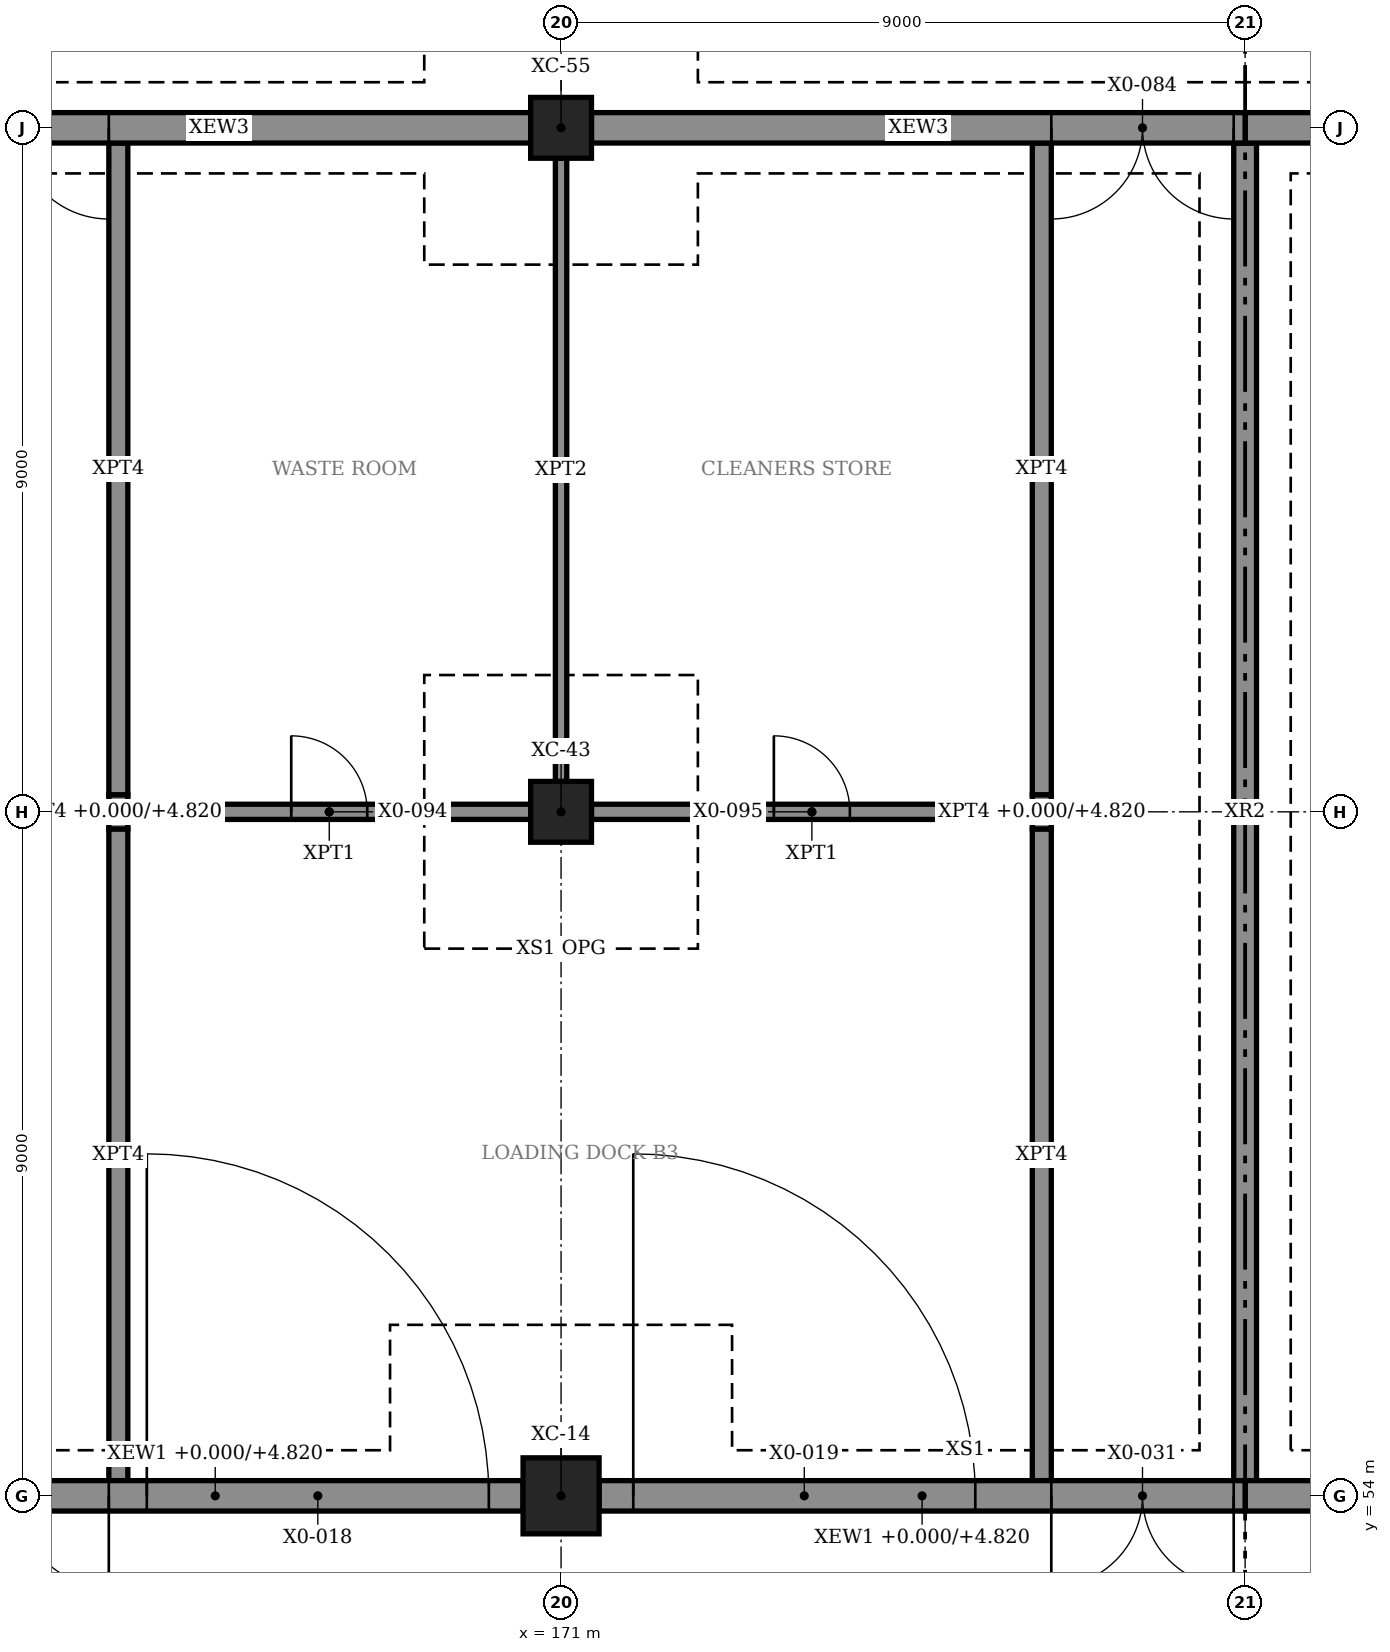
"""IFC4 building model, lengths in metres.
Left out: names, types, materials, properties, quantities, classifications, styles, units other than length and angle.
Written with IfcOpenShell. Run it as: python <this file> out.ifc"""

import sys

from ifc_helpers import new_model, si_unit, direction, frame, frame_2d, origin, origin_2d, place, context, subcontext, project, spatial, rectangle, hollow_rectangle, extrude, element, fill, save


model = new_model("IFC4")
c1 = context("Model", 3, precision=1e-05, world=origin(), true_north=direction((0.0, 1.0)))
c2 = subcontext(c1, "Body", "Model", "MODEL_VIEW")
j1 = project(units=[si_unit("LENGTHUNIT", "METRE"), si_unit("PLANEANGLEUNIT", "RADIAN")], contexts=[c1])
p1 = place(None, origin())
s1 = spatial("IfcSite", under=j1, at=p1, CompositionType="ELEMENT")
p2 = place(p1, origin())
s2 = spatial("IfcBuilding", under=s1, at=p2, CompositionType="ELEMENT")
p3 = place(p2, origin())
s3 = spatial("IfcBuildingStorey", under=s2, at=p3, CompositionType="ELEMENT", Elevation=0.0)
p4 = place(p3, frame((171.0, 54.0, 0.0), z_axis=(0.0, 0.0, 1.0), x_axis=(1.0, 0.0, 0.0)))
e1 = element("IfcColumn", 1, at=p4, inside=s3, PredefinedType="COLUMN", context=c2, shape_type="SweptSolid", body=[
    extrude(hollow_rectangle(XDim=1.0, YDim=1.0, WallThickness=0.032, at=origin_2d()), origin(), (0.0, 0.0, 1.0), 6.0),
])
for number, where, z_axis, x_axis in (
    (2, (171.0, 63.0, 0.0), (0.0, 0.0, 1.0), (1.0, 0.0, 0.0)),
    (3, (171.0, 72.0, 0.0), (0.0, 0.0, 1.0), (1.0, 0.0, 0.0)),
):
    element("IfcColumn", number, at=place(p3, frame(where, z_axis=z_axis, x_axis=x_axis)), inside=s3, PredefinedType="COLUMN", context=c2, shape_type="SweptSolid", body=[
        extrude(rectangle(XDim=0.8, YDim=0.8, at=origin_2d()), origin(), (0.0, 0.0, 1.0), 6.0),
    ])
p5 = place(p3, frame((180.0, 54.2, 0.0), z_axis=(0.0, 0.0, 1.0), x_axis=(0.0, 1.0, 0.0)))
e4 = element("IfcWall", 4, at=p5, inside=s3, PredefinedType="SOLIDWALL", context=c2, shape_type="SweptSolid", body=[
    extrude(rectangle(XDim=17.6, YDim=0.3, at=frame_2d((8.8, 0.0))), origin(), (0.0, 0.0, 1.0), 5.72),
])
p6 = place(p3, frame((162.4, 54.0, 0.0), z_axis=(0.0, 0.0, 1.0), x_axis=(1.0, 0.0, 0.0)))
e5 = element("IfcWall", 5, at=p6, inside=s3, PredefinedType="SOLIDWALL", context=c2, shape_type="SweptSolid", body=[
    extrude(rectangle(XDim=8.1, YDim=0.4, at=frame_2d((4.05, 0.0))), origin(), (0.0, 0.0, 1.0), 4.82),
])
p7 = place(p6, frame((3.15, 0.0, 0.0)))
e6 = element("IfcOpeningElement", 6, at=p7, cuts=e5, PredefinedType="OPENING", context=c2, shape_type="SweptSolid", body=[
    extrude(rectangle(XDim=4.5, YDim=4.5, at=frame_2d((2.25, 2.25))), frame((0.0, 0.21, 0.0), z_axis=(0.0, -1.0, 0.0), x_axis=(1.0, 0.0, 0.0)), (0.0, 0.0, 1.0), 0.42),
])
p8 = place(p6, frame((0.25, 0.0, 0.0)))
e7 = element("IfcOpeningElement", 7, at=p8, cuts=e5, PredefinedType="OPENING", context=c2, shape_type="SweptSolid", body=[
    extrude(rectangle(XDim=2.4, YDim=2.4, at=frame_2d((1.2, 1.2))), frame((0.0, 0.21, 0.0), z_axis=(0.0, -1.0, 0.0), x_axis=(1.0, 0.0, 0.0)), (0.0, 0.0, 1.0), 0.42),
])
p9 = place(p3, frame((171.5, 54.0, 0.0), z_axis=(0.0, 0.0, 1.0), x_axis=(1.0, 0.0, 0.0)))
e8 = element("IfcWall", 8, at=p9, inside=s3, PredefinedType="SOLIDWALL", context=c2, shape_type="SweptSolid", body=[
    extrude(rectangle(XDim=8.5, YDim=0.4, at=frame_2d((4.25, 0.0))), origin(), (0.0, 0.0, 1.0), 4.82),
])
p10 = place(p9, frame((0.45, 0.0, 0.0)))
e9 = element("IfcOpeningElement", 9, at=p10, cuts=e8, PredefinedType="OPENING", context=c2, shape_type="SweptSolid", body=[
    extrude(rectangle(XDim=4.5, YDim=4.5, at=frame_2d((2.25, 2.25))), frame((0.0, 0.21, 0.0), z_axis=(0.0, -1.0, 0.0), x_axis=(1.0, 0.0, 0.0)), (0.0, 0.0, 1.0), 0.42),
])
p11 = place(p9, frame((5.95, 0.0, 0.0)))
e10 = element("IfcOpeningElement", 10, at=p11, cuts=e8, PredefinedType="OPENING", context=c2, shape_type="SweptSolid", body=[
    extrude(rectangle(XDim=2.4, YDim=2.4, at=frame_2d((1.2, 1.2))), frame((0.0, 0.21, 0.0), z_axis=(0.0, -1.0, 0.0), x_axis=(1.0, 0.0, 0.0)), (0.0, 0.0, 1.0), 0.42),
])
p12 = place(p3, frame((180.0, 54.0, 0.0), z_axis=(0.0, 0.0, 1.0), x_axis=(1.0, 0.0, 0.0)))
e11 = element("IfcWall", 11, at=p12, inside=s3, PredefinedType="SOLIDWALL", context=c2, shape_type="SweptSolid", body=[
    extrude(rectangle(XDim=8.5, YDim=0.4, at=frame_2d((4.25, 0.0))), origin(), (0.0, 0.0, 1.0), 5.3),
])
p13 = place(p12, frame((1.9, 0.0, 0.0)))
e12 = element("IfcOpeningElement", 12, at=p13, cuts=e11, PredefinedType="OPENING", context=c2, shape_type="SweptSolid", body=[
    extrude(rectangle(XDim=5.2, YDim=5.2, at=frame_2d((2.6, 2.6))), frame((0.0, 0.21, 0.0), z_axis=(0.0, -1.0, 0.0), x_axis=(1.0, 0.0, 0.0)), (0.0, 0.0, 1.0), 0.42),
])
p14 = place(p3, frame((162.4, 72.0, 0.0), z_axis=(0.0, 0.0, 1.0), x_axis=(1.0, 0.0, 0.0)))
e13 = element("IfcWall", 13, at=p14, inside=s3, PredefinedType="SOLIDWALL", context=c2, shape_type="SweptSolid", body=[
    extrude(rectangle(XDim=8.2, YDim=0.4, at=frame_2d((4.1, 0.0))), origin(), (0.0, 0.0, 1.0), 4.82),
])
p15 = place(p14, frame((0.25, 0.0, 0.0)))
e14 = element("IfcOpeningElement", 14, at=p15, cuts=e13, PredefinedType="OPENING", context=c2, shape_type="SweptSolid", body=[
    extrude(rectangle(XDim=2.4, YDim=2.4, at=frame_2d((1.2, 1.2))), frame((0.0, 0.21, 0.0), z_axis=(0.0, -1.0, 0.0), x_axis=(1.0, 0.0, 0.0)), (0.0, 0.0, 1.0), 0.42),
])
p16 = place(p3, frame((171.4, 72.0, 0.0), z_axis=(0.0, 0.0, 1.0), x_axis=(1.0, 0.0, 0.0)))
e15 = element("IfcWall", 15, at=p16, inside=s3, PredefinedType="SOLIDWALL", context=c2, shape_type="SweptSolid", body=[
    extrude(rectangle(XDim=8.6, YDim=0.4, at=frame_2d((4.3, 0.0))), origin(), (0.0, 0.0, 1.0), 4.82),
])
p17 = place(p16, frame((6.05, 0.0, 0.0)))
e16 = element("IfcOpeningElement", 16, at=p17, cuts=e15, PredefinedType="OPENING", context=c2, shape_type="SweptSolid", body=[
    extrude(rectangle(XDim=2.4, YDim=2.4, at=frame_2d((1.2, 1.2))), frame((0.0, 0.21, 0.0), z_axis=(0.0, -1.0, 0.0), x_axis=(1.0, 0.0, 0.0)), (0.0, 0.0, 1.0), 0.42),
])
p18 = place(p3, frame((180.0, 72.0, 0.0), z_axis=(0.0, 0.0, 1.0), x_axis=(1.0, 0.0, 0.0)))
e17 = element("IfcWall", 17, at=p18, inside=s3, PredefinedType="SOLIDWALL", context=c2, shape_type="SweptSolid", body=[
    extrude(rectangle(XDim=9.0, YDim=0.4, at=frame_2d((4.5, 0.0))), origin(), (0.0, 0.0, 1.0), 5.3),
])
p19 = place(p18, frame((1.9, 0.0, 0.0)))
e18 = element("IfcOpeningElement", 18, at=p19, cuts=e17, PredefinedType="OPENING", context=c2, shape_type="SweptSolid", body=[
    extrude(rectangle(XDim=5.2, YDim=5.2, at=frame_2d((2.6, 2.6))), frame((0.0, 0.21, 0.0), z_axis=(0.0, -1.0, 0.0), x_axis=(1.0, 0.0, 0.0)), (0.0, 0.0, 1.0), 0.42),
])
p20 = place(p3, frame((165.3, 63.0, 0.0), z_axis=(0.0, 0.0, 1.0), x_axis=(1.0, 0.0, 0.0)))
e19 = element("IfcWall", 19, at=p20, inside=s3, PredefinedType="PARTITIONING", context=c2, shape_type="SweptSolid", body=[
    extrude(rectangle(XDim=5.3, YDim=0.2, at=frame_2d((2.65, 0.0))), origin(), (0.0, 0.0, 1.0), 4.82),
])
p21 = place(p20, frame((2.15, 0.0, 0.015)))
e20 = element("IfcOpeningElement", 20, at=p21, cuts=e19, PredefinedType="OPENING", context=c2, shape_type="SweptSolid", body=[
    extrude(rectangle(XDim=1.0, YDim=2.4, at=frame_2d((0.5, 1.2))), frame((0.0, 0.11, 0.0), z_axis=(0.0, -1.0, 0.0), x_axis=(1.0, 0.0, 0.0)), (0.0, 0.0, 1.0), 0.22),
])
p22 = place(p3, frame((171.4, 63.0, 0.0), z_axis=(0.0, 0.0, 1.0), x_axis=(1.0, 0.0, 0.0)))
e21 = element("IfcWall", 21, at=p22, inside=s3, PredefinedType="PARTITIONING", context=c2, shape_type="SweptSolid", body=[
    extrude(rectangle(XDim=5.8, YDim=0.2, at=frame_2d((2.9, 0.0))), origin(), (0.0, 0.0, 1.0), 4.82),
])
p23 = place(p22, frame((2.4, 0.0, 0.015)))
e22 = element("IfcOpeningElement", 22, at=p23, cuts=e21, PredefinedType="OPENING", context=c2, shape_type="SweptSolid", body=[
    extrude(rectangle(XDim=1.0, YDim=2.4, at=frame_2d((0.5, 1.2))), frame((0.0, 0.11, 0.0), z_axis=(0.0, -1.0, 0.0), x_axis=(1.0, 0.0, 0.0)), (0.0, 0.0, 1.0), 0.22),
])
p24 = place(p3, frame((171.0, 63.4, 0.0), z_axis=(0.0, 0.0, 1.0), x_axis=(0.0, 1.0, 0.0)))
e23 = element("IfcWall", 23, at=p24, inside=s3, PredefinedType="PARTITIONING", context=c2, shape_type="SweptSolid", body=[
    extrude(rectangle(XDim=8.2, YDim=0.15, at=frame_2d((4.1, 0.0))), origin(), (0.0, 0.0, 1.0), 4.92),
])
p25 = place(p3, frame((165.175, 54.2, 0.0), z_axis=(0.0, 0.0, 1.0), x_axis=(0.0, 1.0, 0.0)))
e24 = element("IfcWall", 24, at=p25, inside=s3, PredefinedType="PARTITIONING", context=c2, shape_type="SweptSolid", body=[
    extrude(rectangle(XDim=8.575, YDim=0.25, at=frame_2d((4.288, 0.0))), origin(), (0.0, 0.0, 1.0), 5.72),
])
p26 = place(p3, frame((165.175, 62.775, 0.0), z_axis=(0.0, 0.0, 1.0), x_axis=(0.0, 1.0, 0.0)))
e25 = element("IfcWall", 25, at=p26, inside=s3, PredefinedType="PARTITIONING", context=c2, shape_type="SweptSolid", body=[
    extrude(rectangle(XDim=0.45, YDim=0.25, at=frame_2d((0.225, 0.0))), origin(), (0.0, 0.0, 1.0), 4.82),
])
for number, where, z_axis, x_axis in (
    (26, (165.175, 63.225, 0.0), (0.0, 0.0, 1.0), (0.0, 1.0, 0.0)),
    (27, (177.325, 54.2, 0.0), (0.0, 0.0, 1.0), (0.0, 1.0, 0.0)),
):
    element("IfcWall", number, at=place(p3, frame(where, z_axis=z_axis, x_axis=x_axis)), inside=s3, PredefinedType="PARTITIONING", context=c2, shape_type="SweptSolid", body=[
        extrude(rectangle(XDim=8.575, YDim=0.25, at=frame_2d((4.288, 0.0))), origin(), (0.0, 0.0, 1.0), 5.72),
    ])
p27 = place(p3, frame((177.325, 62.775, 0.0), z_axis=(0.0, 0.0, 1.0), x_axis=(0.0, 1.0, 0.0)))
e28 = element("IfcWall", 28, at=p27, inside=s3, PredefinedType="PARTITIONING", context=c2, shape_type="SweptSolid", body=[
    extrude(rectangle(XDim=0.45, YDim=0.25, at=frame_2d((0.225, 0.0))), origin(), (0.0, 0.0, 1.0), 4.82),
])
p28 = place(p3, frame((177.325, 63.225, 0.0), z_axis=(0.0, 0.0, 1.0), x_axis=(0.0, 1.0, 0.0)))
e29 = element("IfcWall", 29, at=p28, inside=s3, PredefinedType="PARTITIONING", context=c2, shape_type="SweptSolid", body=[
    extrude(rectangle(XDim=8.575, YDim=0.25, at=frame_2d((4.288, 0.0))), origin(), (0.0, 0.0, 1.0), 5.72),
])
p29 = place(p7, origin())
e30 = element("IfcDoor", 30, at=p29, inside=s3, OperationType="ROLLINGUP", PredefinedType="DOOR", context=c2, shape_type="SweptSolid", body=[
    extrude(rectangle(XDim=4.5, YDim=4.5, at=frame_2d((2.25, 2.25))), frame((0.0, 0.025, 0.0), z_axis=(0.0, -1.0, 0.0), x_axis=(1.0, 0.0, 0.0)), (0.0, 0.0, 1.0), 0.05),
])
fill(e6, e30)
p30 = place(p10, origin())
e31 = element("IfcDoor", 31, at=p30, inside=s3, OperationType="ROLLINGUP", PredefinedType="DOOR", context=c2, shape_type="SweptSolid", body=[
    extrude(rectangle(XDim=4.5, YDim=4.5, at=frame_2d((2.25, 2.25))), frame((0.0, 0.025, 0.0), z_axis=(0.0, -1.0, 0.0), x_axis=(1.0, 0.0, 0.0)), (0.0, 0.0, 1.0), 0.05),
])
fill(e9, e31)
p31 = place(p8, frame((2.4, 0.0, 0.0), z_axis=(0.0, 0.0, 1.0), x_axis=(-1.0, 0.0, 0.0)))
e32 = element("IfcDoor", 32, at=p31, inside=s3, OperationType="DOUBLE_DOOR_SINGLE_SWING", PredefinedType="DOOR", context=c2, shape_type="SweptSolid", body=[
    extrude(rectangle(XDim=2.4, YDim=2.4, at=frame_2d((1.2, 1.2))), frame((0.0, 0.025, 0.0), z_axis=(0.0, -1.0, 0.0), x_axis=(1.0, 0.0, 0.0)), (0.0, 0.0, 1.0), 0.05),
])
fill(e7, e32)
p32 = place(p11, frame((2.4, 0.0, 0.0), z_axis=(0.0, 0.0, 1.0), x_axis=(-1.0, 0.0, 0.0)))
e33 = element("IfcDoor", 33, at=p32, inside=s3, OperationType="DOUBLE_DOOR_SINGLE_SWING", PredefinedType="DOOR", context=c2, shape_type="SweptSolid", body=[
    extrude(rectangle(XDim=2.4, YDim=2.4, at=frame_2d((1.2, 1.2))), frame((0.0, 0.025, 0.0), z_axis=(0.0, -1.0, 0.0), x_axis=(1.0, 0.0, 0.0)), (0.0, 0.0, 1.0), 0.05),
])
fill(e10, e33)
p33 = place(p15, frame((2.4, 0.0, 0.0), z_axis=(0.0, 0.0, 1.0), x_axis=(-1.0, 0.0, 0.0)))
e34 = element("IfcDoor", 34, at=p33, inside=s3, OperationType="DOUBLE_DOOR_SINGLE_SWING", PredefinedType="DOOR", context=c2, shape_type="SweptSolid", body=[
    extrude(rectangle(XDim=2.4, YDim=2.4, at=frame_2d((1.2, 1.2))), frame((0.0, 0.025, 0.0), z_axis=(0.0, -1.0, 0.0), x_axis=(1.0, 0.0, 0.0)), (0.0, 0.0, 1.0), 0.05),
])
fill(e14, e34)
p34 = place(p17, frame((2.4, 0.0, 0.0), z_axis=(0.0, 0.0, 1.0), x_axis=(-1.0, 0.0, 0.0)))
e35 = element("IfcDoor", 35, at=p34, inside=s3, OperationType="DOUBLE_DOOR_SINGLE_SWING", PredefinedType="DOOR", context=c2, shape_type="SweptSolid", body=[
    extrude(rectangle(XDim=2.4, YDim=2.4, at=frame_2d((1.2, 1.2))), frame((0.0, 0.025, 0.0), z_axis=(0.0, -1.0, 0.0), x_axis=(1.0, 0.0, 0.0)), (0.0, 0.0, 1.0), 0.05),
])
fill(e16, e35)
p35 = place(p21, origin())
e36 = element("IfcDoor", 36, at=p35, inside=s3, OperationType="SINGLE_SWING_LEFT", PredefinedType="DOOR", context=c2, shape_type="SweptSolid", body=[
    extrude(rectangle(XDim=1.0, YDim=2.4, at=frame_2d((0.5, 1.2))), frame((0.0, 0.025, 0.0), z_axis=(0.0, -1.0, 0.0), x_axis=(1.0, 0.0, 0.0)), (0.0, 0.0, 1.0), 0.05),
])
fill(e20, e36)
p36 = place(p23, origin())
e37 = element("IfcDoor", 37, at=p36, inside=s3, OperationType="SINGLE_SWING_LEFT", PredefinedType="DOOR", context=c2, shape_type="SweptSolid", body=[
    extrude(rectangle(XDim=1.0, YDim=2.4, at=frame_2d((0.5, 1.2))), frame((0.0, 0.025, 0.0), z_axis=(0.0, -1.0, 0.0), x_axis=(1.0, 0.0, 0.0)), (0.0, 0.0, 1.0), 0.05),
])
fill(e22, e37)
save(model, sys.argv[1])
